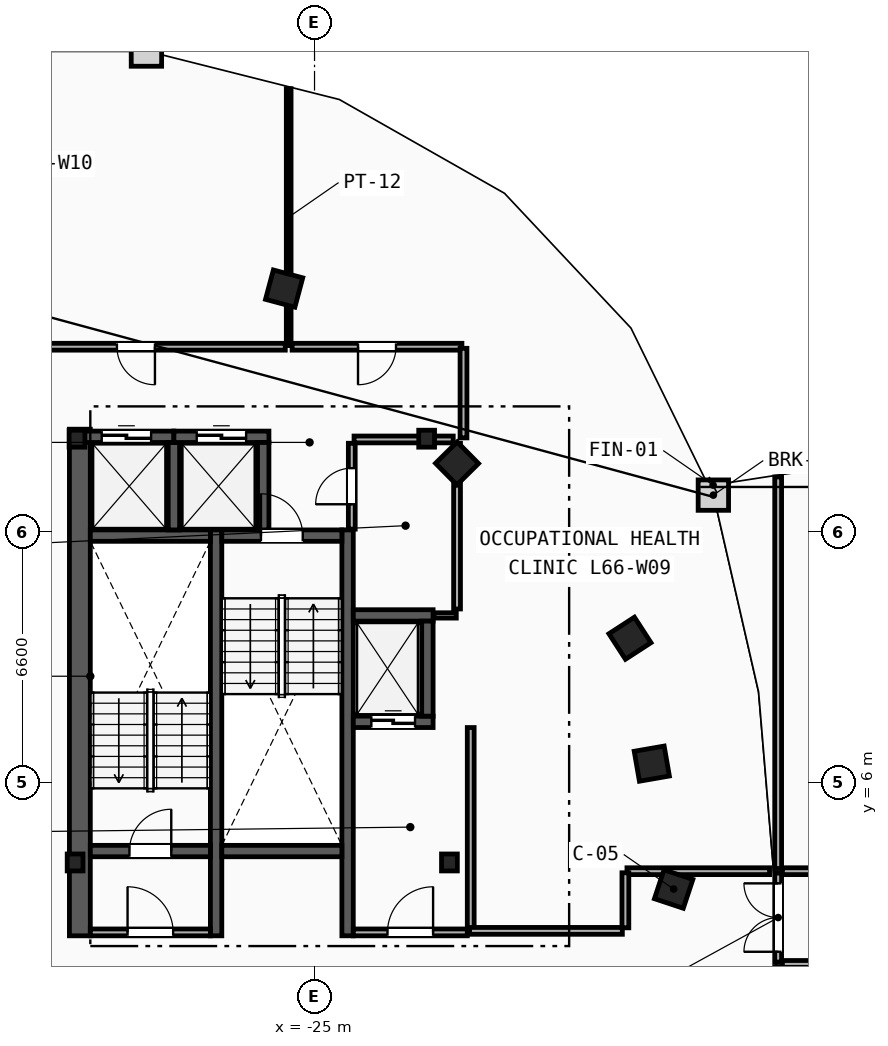
"""IFC4 building model, lengths in metres.
Left out: names, types, materials, properties, quantities, classifications, styles, units other than length and angle.
Written with IfcOpenShell. Run it as: python <this file> out.ifc"""

import sys

from ifc_helpers import new_model, si_unit, direction, frame, frame_2d, origin, origin_2d, place, context, subcontext, project, spatial, rectangle, i_section, extrude, element, fill, save


model = new_model("IFC4")
c1 = context("Model", 3, precision=1e-05, world=origin(), true_north=direction((0.0, 1.0)))
c2 = subcontext(c1, "Body", "Model", "MODEL_VIEW")
j1 = project(units=[si_unit("LENGTHUNIT", "METRE"), si_unit("PLANEANGLEUNIT", "RADIAN")], contexts=[c1])
p1 = place(None, origin())
s1 = spatial("IfcSite", under=j1, at=p1, CompositionType="ELEMENT")
p2 = place(p1, origin())
s2 = spatial("IfcBuilding", under=s1, at=p2, CompositionType="ELEMENT")
p3 = place(p2, frame((0.0, 0.0, 250.4)))
s3 = spatial("IfcBuildingStorey", under=s2, at=p3, CompositionType="ELEMENT", Elevation=250.4)
for number, where, z_axis, x_axis in (
    (1, (-31.3, 3.9, 0.0), (0.0, 0.0, 1.0), (1.0, 0.0, 0.0)),
    (2, (-21.45, 3.9, 0.0), (0.0, 0.0, 1.0), (1.0, 0.0, 0.0)),
    (3, (-22.05, 15.05, 0.0), (0.0, 0.0, 1.0), (1.0, 0.0, 0.0)),
    (4, (-31.25, 15.05, 0.0), (0.0, 0.0, 1.0), (1.0, 0.0, 0.0)),
):
    element("IfcColumn", number, at=place(p3, frame(where, z_axis=z_axis, x_axis=x_axis)), inside=s3, PredefinedType="COLUMN", context=c2, shape_type="SweptSolid", body=[
        extrude(i_section(OverallWidth=0.416, OverallDepth=0.446, WebThickness=0.039, FlangeThickness=0.063, FilletRadius=0.018, at=origin_2d()), origin(), (0.0, 0.0, 1.0), 3.6),
    ])
for number, where, z_axis, x_axis in (
    (5, (-15.55, 3.2, 0.0), (0.0, 0.0, 1.0), (0.315, 0.949, 0.0)),
    (6, (-16.125, 6.5, 0.0), (0.0, 0.0, 1.0), (-0.172, 0.985, 0.0)),
    (7, (-16.7, 9.8, 0.0), (0.0, 0.0, 1.0), (-0.544, 0.839, 0.0)),
    (8, (-21.25, 14.4, 0.0), (0.0, 0.0, 1.0), (-0.703, 0.711, 0.0)),
    (9, (-25.8, 19.0, 0.0), (0.0, 0.0, 1.0), (-0.966, 0.259, 0.0)),
):
    element("IfcColumn", number, at=place(p3, frame(where, z_axis=z_axis, x_axis=x_axis)), inside=s3, PredefinedType="COLUMN", context=c2, shape_type="SweptSolid", body=[
        extrude(rectangle(XDim=0.8, YDim=0.8, at=origin_2d()), origin(), (0.0, 0.0, 1.0), 3.6),
    ])
p4 = place(p3, frame((-31.175, 1.97, 0.0), z_axis=(0.0, 0.0, 1.0), x_axis=(0.0, 1.0, 0.0)))
e10 = element("IfcWall", 10, at=p4, inside=s3, PredefinedType="SHEAR", context=c2, shape_type="SweptSolid", body=[
    extrude(rectangle(XDim=13.33, YDim=0.55, at=frame_2d((6.665, 0.0))), origin(), (0.0, 0.0, 1.0), 3.34),
])
for number, where, z_axis, x_axis in (
    (11, (-27.59, 1.97, 0.0), (0.0, 0.0, 1.0), (0.0, 1.0, 0.0)),
    (12, (-24.13, 1.97, 0.0), (0.0, 0.0, 1.0), (0.0, 1.0, 0.0)),
):
    element("IfcWall", number, at=place(p3, frame(where, z_axis=z_axis, x_axis=x_axis)), inside=s3, PredefinedType="SHEAR", context=c2, shape_type="SweptSolid", body=[
        extrude(rectangle(XDim=10.68, YDim=0.3, at=frame_2d((5.34, 0.0))), origin(), (0.0, 0.0, 1.0), 3.34),
    ])
p5 = place(p3, frame((-30.9, 4.2, 0.0), z_axis=(0.0, 0.0, 1.0), x_axis=(1.0, 0.0, 0.0)))
e13 = element("IfcWall", 13, at=p5, inside=s3, PredefinedType="SHEAR", context=c2, shape_type="SweptSolid", body=[
    extrude(rectangle(XDim=3.16, YDim=0.3, at=frame_2d((1.58, 0.0))), origin(), (0.0, 0.0, 1.0), 3.34),
])
p6 = place(p5, frame((1.03, 0.0, 0.0)))
e14 = element("IfcOpeningElement", 14, at=p6, cuts=e13, PredefinedType="OPENING", context=c2, shape_type="SweptSolid", body=[
    extrude(rectangle(XDim=1.1, YDim=2.15, at=frame_2d((0.55, 1.075))), frame((0.0, 0.16, 0.0), z_axis=(0.0, -1.0, 0.0), x_axis=(1.0, 0.0, 0.0)), (0.0, 0.0, 1.0), 0.32),
])
p7 = place(p3, frame((-30.9, 12.5, 0.0), z_axis=(0.0, 0.0, 1.0), x_axis=(1.0, 0.0, 0.0)))
e15 = element("IfcWall", 15, at=p7, inside=s3, PredefinedType="SHEAR", context=c2, shape_type="SweptSolid", body=[
    extrude(rectangle(XDim=3.16, YDim=0.3, at=frame_2d((1.58, 0.0))), origin(), (0.0, 0.0, 1.0), 3.34),
])
p8 = place(p3, frame((-27.44, 12.5, 0.0), z_axis=(0.0, 0.0, 1.0), x_axis=(1.0, 0.0, 0.0)))
e16 = element("IfcWall", 16, at=p8, inside=s3, PredefinedType="SHEAR", context=c2, shape_type="SweptSolid", body=[
    extrude(rectangle(XDim=3.16, YDim=0.3, at=frame_2d((1.58, 0.0))), origin(), (0.0, 0.0, 1.0), 3.34),
])
p9 = place(p8, frame((1.03, 0.0, 0.0)))
e17 = element("IfcOpeningElement", 17, at=p9, cuts=e16, PredefinedType="OPENING", context=c2, shape_type="SweptSolid", body=[
    extrude(rectangle(XDim=1.1, YDim=2.15, at=frame_2d((0.55, 1.075))), frame((0.0, 0.16, 0.0), z_axis=(0.0, -1.0, 0.0), x_axis=(1.0, 0.0, 0.0)), (0.0, 0.0, 1.0), 0.32),
])
p10 = place(p3, frame((-27.44, 4.2, 0.0), z_axis=(0.0, 0.0, 1.0), x_axis=(1.0, 0.0, 0.0)))
e18 = element("IfcWall", 18, at=p10, inside=s3, PredefinedType="SHEAR", context=c2, shape_type="SweptSolid", body=[
    extrude(rectangle(XDim=3.16, YDim=0.3, at=frame_2d((1.58, 0.0))), origin(), (0.0, 0.0, 1.0), 3.34),
])
p11 = place(p3, frame((-20.89, 2.15, 0.0), z_axis=(0.0, 0.0, 1.0), x_axis=(0.0, 1.0, 0.0)))
e19 = element("IfcWall", 19, at=p11, inside=s3, PredefinedType="PARTITIONING", context=c2, shape_type="SweptSolid", body=[
    extrude(rectangle(XDim=5.3, YDim=0.18, at=frame_2d((2.65, 0.0))), origin(), (0.0, 0.0, 1.0), 3.34),
])
p12 = place(p3, frame((-23.98, 2.06, 0.0), z_axis=(0.0, 0.0, 1.0), x_axis=(1.0, 0.0, 0.0)))
e20 = element("IfcWall", 20, at=p12, inside=s3, PredefinedType="PARTITIONING", context=c2, shape_type="SweptSolid", body=[
    extrude(rectangle(XDim=3.0, YDim=0.18, at=frame_2d((1.5, 0.0))), origin(), (0.0, 0.0, 1.0), 3.34),
])
p13 = place(p12, frame((0.9, 0.0, 0.0)))
e21 = element("IfcOpeningElement", 21, at=p13, cuts=e20, PredefinedType="OPENING", context=c2, shape_type="SweptSolid", body=[
    extrude(rectangle(XDim=1.2, YDim=2.15, at=frame_2d((0.6, 1.075))), frame((0.0, 0.1, 0.0), z_axis=(0.0, -1.0, 0.0), x_axis=(1.0, 0.0, 0.0)), (0.0, 0.0, 1.0), 0.2),
])
p14 = place(p3, frame((-30.9, 2.06, 0.0), z_axis=(0.0, 0.0, 1.0), x_axis=(1.0, 0.0, 0.0)))
e22 = element("IfcWall", 22, at=p14, inside=s3, PredefinedType="PARTITIONING", context=c2, shape_type="SweptSolid", body=[
    extrude(rectangle(XDim=3.16, YDim=0.18, at=frame_2d((1.58, 0.0))), origin(), (0.0, 0.0, 1.0), 3.34),
])
p15 = place(p14, frame((0.98, 0.0, 0.0)))
e23 = element("IfcOpeningElement", 23, at=p15, cuts=e22, PredefinedType="OPENING", context=c2, shape_type="SweptSolid", body=[
    extrude(rectangle(XDim=1.2, YDim=2.15, at=frame_2d((0.6, 1.075))), frame((0.0, 0.1, 0.0), z_axis=(0.0, -1.0, 0.0), x_axis=(1.0, 0.0, 0.0)), (0.0, 0.0, 1.0), 0.2),
])
p16 = place(p3, frame((-23.98, 7.6, 0.0), z_axis=(0.0, 0.0, 1.0), x_axis=(1.0, 0.0, 0.0)))
e24 = element("IfcWall", 24, at=p16, inside=s3, PredefinedType="SHEAR", context=c2, shape_type="SweptSolid", body=[
    extrude(rectangle(XDim=2.1, YDim=0.3, at=frame_2d((1.05, 0.0))), origin(), (0.0, 0.0, 1.0), 3.34),
])
p17 = place(p16, frame((0.475, 0.0, 0.0)))
e25 = element("IfcOpeningElement", 25, at=p17, cuts=e24, PredefinedType="OPENING", context=c2, shape_type="SweptSolid", body=[
    extrude(rectangle(XDim=1.15, YDim=2.2, at=frame_2d((0.575, 1.1))), frame((0.0, 0.16, 0.0), z_axis=(0.0, -1.0, 0.0), x_axis=(1.0, 0.0, 0.0)), (0.0, 0.0, 1.0), 0.32),
])
p18 = place(p3, frame((-23.98, 10.4, 0.0), z_axis=(0.0, 0.0, 1.0), x_axis=(1.0, 0.0, 0.0)))
e26 = element("IfcWall", 26, at=p18, inside=s3, PredefinedType="SHEAR", context=c2, shape_type="SweptSolid", body=[
    extrude(rectangle(XDim=2.1, YDim=0.3, at=frame_2d((1.05, 0.0))), origin(), (0.0, 0.0, 1.0), 3.34),
])
p19 = place(p3, frame((-22.03, 7.75, 0.0), z_axis=(0.0, 0.0, 1.0), x_axis=(0.0, 1.0, 0.0)))
e27 = element("IfcWall", 27, at=p19, inside=s3, PredefinedType="SHEAR", context=c2, shape_type="SweptSolid", body=[
    extrude(rectangle(XDim=2.5, YDim=0.3, at=frame_2d((1.25, 0.0))), origin(), (0.0, 0.0, 1.0), 3.34),
])
p20 = place(p3, frame((-31.2, 15.1, 0.0), z_axis=(0.0, 0.0, 1.0), x_axis=(1.0, 0.0, 0.0)))
e28 = element("IfcWall", 28, at=p20, inside=s3, PredefinedType="SHEAR", context=c2, shape_type="SweptSolid", body=[
    extrude(rectangle(XDim=2.5, YDim=0.3, at=frame_2d((1.25, 0.0))), origin(), (0.0, 0.0, 1.0), 3.34),
])
p21 = place(p20, frame((0.6, 0.0, 0.0)))
e29 = element("IfcOpeningElement", 29, at=p21, cuts=e28, PredefinedType="OPENING", context=c2, shape_type="SweptSolid", body=[
    extrude(rectangle(XDim=1.3, YDim=2.2, at=frame_2d((0.65, 1.1))), frame((0.0, 0.16, 0.0), z_axis=(0.0, -1.0, 0.0), x_axis=(1.0, 0.0, 0.0)), (0.0, 0.0, 1.0), 0.32),
])
p22 = place(p3, frame((-28.7, 12.65, 0.0), z_axis=(0.0, 0.0, 1.0), x_axis=(0.0, 1.0, 0.0)))
e30 = element("IfcWall", 30, at=p22, inside=s3, PredefinedType="SHEAR", context=c2, shape_type="SweptSolid", body=[
    extrude(rectangle(XDim=2.3, YDim=0.3, at=frame_2d((1.15, 0.0))), origin(), (0.0, 0.0, 1.0), 3.34),
])
p23 = place(p3, frame((-28.7, 15.1, 0.0), z_axis=(0.0, 0.0, 1.0), x_axis=(1.0, 0.0, 0.0)))
e31 = element("IfcWall", 31, at=p23, inside=s3, PredefinedType="SHEAR", context=c2, shape_type="SweptSolid", body=[
    extrude(rectangle(XDim=2.5, YDim=0.3, at=frame_2d((1.25, 0.0))), origin(), (0.0, 0.0, 1.0), 3.34),
])
p24 = place(p23, frame((0.6, 0.0, 0.0)))
e32 = element("IfcOpeningElement", 32, at=p24, cuts=e31, PredefinedType="OPENING", context=c2, shape_type="SweptSolid", body=[
    extrude(rectangle(XDim=1.3, YDim=2.2, at=frame_2d((0.65, 1.1))), frame((0.0, 0.16, 0.0), z_axis=(0.0, -1.0, 0.0), x_axis=(1.0, 0.0, 0.0)), (0.0, 0.0, 1.0), 0.32),
])
p25 = place(p3, frame((-26.35, 12.65, 0.0), z_axis=(0.0, 0.0, 1.0), x_axis=(0.0, 1.0, 0.0)))
e33 = element("IfcWall", 33, at=p25, inside=s3, PredefinedType="SHEAR", context=c2, shape_type="SweptSolid", body=[
    extrude(rectangle(XDim=2.3, YDim=0.3, at=frame_2d((1.15, 0.0))), origin(), (0.0, 0.0, 1.0), 3.34),
])
p26 = place(p3, frame((-21.86, 10.4, 0.0), z_axis=(0.0, 0.0, 1.0), x_axis=(1.0, 0.0, 0.0)))
e34 = element("IfcWall", 34, at=p26, inside=s3, PredefinedType="PARTITIONING", context=c2, shape_type="SweptSolid", body=[
    extrude(rectangle(XDim=0.59, YDim=0.14, at=frame_2d((0.295, 0.0))), origin(), (0.0, 0.0, 1.0), 3.34),
])
p27 = place(p3, frame((-21.25, 10.57, 0.0), z_axis=(0.0, 0.0, 1.0), x_axis=(0.0, 1.0, 0.0)))
e35 = element("IfcWall", 35, at=p27, inside=s3, PredefinedType="PARTITIONING", context=c2, shape_type="SweptSolid", body=[
    extrude(rectangle(XDim=4.36, YDim=0.18, at=frame_2d((2.18, 0.0))), origin(), (0.0, 0.0, 1.0), 3.34),
])
p28 = place(p3, frame((-23.96, 15.03, 0.0), z_axis=(0.0, 0.0, 1.0), x_axis=(1.0, 0.0, 0.0)))
e36 = element("IfcWall", 36, at=p28, inside=s3, PredefinedType="PARTITIONING", context=c2, shape_type="SweptSolid", body=[
    extrude(rectangle(XDim=2.61, YDim=0.18, at=frame_2d((1.305, 0.0))), origin(), (0.0, 0.0, 1.0), 2.413),
])
p29 = place(p3, frame((-24.02, 12.67, 0.0), z_axis=(0.0, 0.0, 1.0), x_axis=(0.0, 1.0, 0.0)))
e37 = element("IfcWall", 37, at=p29, inside=s3, PredefinedType="PARTITIONING", context=c2, shape_type="SweptSolid", body=[
    extrude(rectangle(XDim=2.26, YDim=0.18, at=frame_2d((1.13, 0.0))), origin(), (0.0, 0.0, 1.0), 3.34),
])
p30 = place(p29, frame((0.655, 0.0, 0.0)))
e38 = element("IfcOpeningElement", 38, at=p30, cuts=e37, PredefinedType="OPENING", context=c2, shape_type="SweptSolid", body=[
    extrude(rectangle(XDim=0.95, YDim=2.1, at=frame_2d((0.475, 1.05))), frame((0.0, 0.1, 0.0), z_axis=(0.0, -1.0, 0.0), x_axis=(1.0, 0.0, 0.0)), (0.0, 0.0, 1.0), 0.2),
])
p31 = place(p3, frame((-25.68, 17.5, 0.0), z_axis=(0.0, 0.0, 1.0), x_axis=(0.0, 1.0, 0.0)))
e39 = element("IfcWall", 39, at=p31, inside=s3, PredefinedType="PARTITIONING", context=c2, shape_type="SweptSolid", body=[
    extrude(rectangle(XDim=6.76, YDim=0.125, at=frame_2d((3.38, 0.0))), origin(), (0.0, 0.0, 1.0), 3.34),
])
p32 = place(p3, frame((-21.122, 17.47, 0.0), z_axis=(0.0, 0.0, 1.0), x_axis=(-1.0, 0.0, 0.0)))
e40 = element("IfcWall", 40, at=p32, inside=s3, PredefinedType="PARTITIONING", context=c2, shape_type="SweptSolid", body=[
    extrude(rectangle(XDim=4.469, YDim=0.18, at=frame_2d((2.234, 0.0))), origin(), (0.0, 0.0, 1.0), 3.34),
])
p33 = place(p32, frame((1.734, 0.0, 0.0)))
e41 = element("IfcOpeningElement", 41, at=p33, cuts=e40, PredefinedType="OPENING", context=c2, shape_type="SweptSolid", body=[
    extrude(rectangle(XDim=1.0, YDim=2.15, at=frame_2d((0.5, 1.075))), frame((0.0, 0.1, 0.0), z_axis=(0.0, -1.0, 0.0), x_axis=(1.0, 0.0, 0.0)), (0.0, 0.0, 1.0), 0.2),
])
p34 = place(p3, frame((-16.9, 2.1, 0.0), z_axis=(0.0, 0.0, 1.0), x_axis=(-1.0, 0.0, 0.0)))
e42 = element("IfcWall", 42, at=p34, inside=s3, PredefinedType="PARTITIONING", context=c2, shape_type="SweptSolid", body=[
    extrude(rectangle(XDim=4.02, YDim=0.18, at=frame_2d((2.01, 0.0))), origin(), (0.0, 0.0, 1.0), 3.34),
])
p35 = place(p3, frame((-13.026, 3.67, 0.0), z_axis=(0.0, 0.0, 1.0), x_axis=(-1.0, 0.0, 0.0)))
e43 = element("IfcWall", 43, at=p35, inside=s3, PredefinedType="PARTITIONING", context=c2, shape_type="SweptSolid", body=[
    extrude(rectangle(XDim=3.753, YDim=0.18, at=frame_2d((1.876, 0.0))), origin(), (0.0, 0.0, 1.0), 3.34),
])
p36 = place(p3, frame((-21.08, 15.072, 0.0), z_axis=(0.0, 0.0, 1.0), x_axis=(0.0, 1.0, 0.0)))
e44 = element("IfcWall", 44, at=p36, inside=s3, PredefinedType="PARTITIONING", context=c2, shape_type="SweptSolid", body=[
    extrude(rectangle(XDim=2.357, YDim=0.18, at=frame_2d((1.178, 0.0))), origin(), (0.0, 0.0, 1.0), 3.34),
])
p37 = place(p3, frame((-16.82, 3.628, 0.0), z_axis=(0.0, 0.0, 1.0), x_axis=(0.0, -1.0, 0.0)))
e45 = element("IfcWall", 45, at=p37, inside=s3, PredefinedType="PARTITIONING", context=c2, shape_type="SweptSolid", body=[
    extrude(rectangle(XDim=1.448, YDim=0.18, at=frame_2d((0.724, 0.0))), origin(), (0.0, 0.0, 1.0), 3.34),
])
p38 = place(p3, frame((-25.77, 17.47, 0.0), z_axis=(0.0, 0.0, 1.0), x_axis=(-1.0, 0.0, 0.0)))
e46 = element("IfcWall", 46, at=p38, inside=s3, PredefinedType="PARTITIONING", context=c2, shape_type="SweptSolid", body=[
    extrude(rectangle(XDim=7.858, YDim=0.18, at=frame_2d((3.929, 0.0))), origin(), (0.0, 0.0, 1.0), 3.34),
])
p39 = place(p38, frame((3.429, 0.0, 0.0)))
e47 = element("IfcOpeningElement", 47, at=p39, cuts=e46, PredefinedType="OPENING", context=c2, shape_type="SweptSolid", body=[
    extrude(rectangle(XDim=1.0, YDim=2.15, at=frame_2d((0.5, 1.075))), frame((0.0, 0.1, 0.0), z_axis=(0.0, -1.0, 0.0), x_axis=(1.0, 0.0, 0.0)), (0.0, 0.0, 1.0), 0.2),
])
p40 = place(p3, frame((-12.688, 1.23, 0.0), z_axis=(0.0, 0.0, 1.0), x_axis=(1.0, 0.0, 0.0)))
e48 = element("IfcWall", 48, at=p40, inside=s3, PredefinedType="PARTITIONING", context=c2, shape_type="SweptSolid", body=[
    extrude(rectangle(XDim=12.594, YDim=0.18, at=frame_2d((6.297, 0.0))), origin(), (0.0, 0.0, 1.0), 2.663),
])
p41 = place(p40, frame((5.497, 0.0, 0.0)))
e49 = element("IfcOpeningElement", 49, at=p41, cuts=e48, PredefinedType="OPENING", context=c2, shape_type="SweptSolid", body=[
    extrude(rectangle(XDim=1.6, YDim=2.2, at=frame_2d((0.8, 1.1))), frame((0.0, 0.1, 0.0), z_axis=(0.0, -1.0, 0.0), x_axis=(1.0, 0.0, 0.0)), (0.0, 0.0, 1.0), 0.2),
])
p42 = place(p3, frame((-0.095, 3.67, 0.0), z_axis=(0.0, 0.0, 1.0), x_axis=(-1.0, 0.0, 0.0)))
e50 = element("IfcWall", 50, at=p42, inside=s3, PredefinedType="PARTITIONING", context=c2, shape_type="SweptSolid", body=[
    extrude(rectangle(XDim=12.594, YDim=0.18, at=frame_2d((6.297, 0.0))), origin(), (0.0, 0.0, 1.0), 3.34),
])
p43 = place(p42, frame((5.497, 0.0, 0.0)))
e51 = element("IfcOpeningElement", 51, at=p43, cuts=e50, PredefinedType="OPENING", context=c2, shape_type="SweptSolid", body=[
    extrude(rectangle(XDim=1.6, YDim=2.2, at=frame_2d((0.8, 1.1))), frame((0.0, 0.1, 0.0), z_axis=(0.0, -1.0, 0.0), x_axis=(1.0, 0.0, 0.0)), (0.0, 0.0, 1.0), 0.2),
])
p44 = place(p3, frame((-12.8, -0.285, 0.0), z_axis=(0.0, 0.0, 1.0), x_axis=(0.0, 1.0, 0.0)))
e52 = element("IfcWall", 52, at=p44, inside=s3, PredefinedType="PARTITIONING", context=c2, shape_type="SweptSolid", body=[
    extrude(rectangle(XDim=1.445, YDim=0.18, at=frame_2d((0.722, 0.0))), origin(), (0.0, 0.0, 1.0), 3.34),
])
p45 = place(p3, frame((-12.8, 3.74, 0.0), z_axis=(0.0, 0.0, 1.0), x_axis=(0.0, 1.0, 0.0)))
e53 = element("IfcWall", 53, at=p45, inside=s3, PredefinedType="PARTITIONING", context=c2, shape_type="SweptSolid", body=[
    extrude(rectangle(XDim=10.304, YDim=0.18, at=frame_2d((5.152, 0.0))), origin(), (0.0, 0.0, 1.0), 3.34),
])
p46 = place(p3, frame((-12.8, 1.28, 0.0), z_axis=(0.0, 0.0, 1.0), x_axis=(0.0, 1.0, 0.0)))
e54 = element("IfcWall", 54, at=p46, inside=s3, PredefinedType="PARTITIONING", context=c2, shape_type="SweptSolid", body=[
    extrude(rectangle(XDim=2.34, YDim=0.18, at=frame_2d((1.17, 0.0))), origin(), (0.0, 0.0, 1.0), 3.34),
])
p47 = place(p46, frame((0.27, 0.0, 0.0)))
e55 = element("IfcOpeningElement", 55, at=p47, cuts=e54, PredefinedType="OPENING", context=c2, shape_type="SweptSolid", body=[
    extrude(rectangle(XDim=1.8, YDim=2.25, at=frame_2d((0.9, 1.125))), frame((0.0, 0.1, 0.0), z_axis=(0.0, -1.0, 0.0), x_axis=(1.0, 0.0, 0.0)), (0.0, 0.0, 1.0), 0.2),
])
p48 = place(p6, origin())
e56 = element("IfcDoor", 56, at=p48, inside=s3, OperationType="SINGLE_SWING_RIGHT", PredefinedType="DOOR", context=c2, shape_type="SweptSolid", body=[
    extrude(rectangle(XDim=1.1, YDim=2.15, at=frame_2d((0.55, 1.075))), frame((0.0, 0.025, 0.0), z_axis=(0.0, -1.0, 0.0), x_axis=(1.0, 0.0, 0.0)), (0.0, 0.0, 1.0), 0.05),
])
fill(e14, e56)
p49 = place(p9, origin())
e57 = element("IfcDoor", 57, at=p49, inside=s3, OperationType="SINGLE_SWING_LEFT", PredefinedType="DOOR", context=c2, shape_type="SweptSolid", body=[
    extrude(rectangle(XDim=1.1, YDim=2.15, at=frame_2d((0.55, 1.075))), frame((0.0, 0.025, 0.0), z_axis=(0.0, -1.0, 0.0), x_axis=(1.0, 0.0, 0.0)), (0.0, 0.0, 1.0), 0.05),
])
fill(e17, e57)
p50 = place(p13, origin())
e58 = element("IfcDoor", 58, at=p50, inside=s3, OperationType="SINGLE_SWING_RIGHT", PredefinedType="DOOR", context=c2, shape_type="SweptSolid", body=[
    extrude(rectangle(XDim=1.2, YDim=2.15, at=frame_2d((0.6, 1.075))), frame((0.0, 0.025, 0.0), z_axis=(0.0, -1.0, 0.0), x_axis=(1.0, 0.0, 0.0)), (0.0, 0.0, 1.0), 0.05),
])
fill(e21, e58)
p51 = place(p15, origin())
e59 = element("IfcDoor", 59, at=p51, inside=s3, OperationType="SINGLE_SWING_LEFT", PredefinedType="DOOR", context=c2, shape_type="SweptSolid", body=[
    extrude(rectangle(XDim=1.2, YDim=2.15, at=frame_2d((0.6, 1.075))), frame((0.0, 0.025, 0.0), z_axis=(0.0, -1.0, 0.0), x_axis=(1.0, 0.0, 0.0)), (0.0, 0.0, 1.0), 0.05),
])
fill(e23, e59)
p52 = place(p17, origin())
e60 = element("IfcDoor", 60, at=p52, inside=s3, OperationType="SLIDING_TO_LEFT", PredefinedType="TRAPDOOR", context=c2, shape_type="SweptSolid", body=[
    extrude(rectangle(XDim=1.15, YDim=2.2, at=frame_2d((0.575, 1.1))), frame((0.0, 0.025, 0.0), z_axis=(0.0, -1.0, 0.0), x_axis=(1.0, 0.0, 0.0)), (0.0, 0.0, 1.0), 0.05),
])
fill(e25, e60)
p53 = place(p21, origin())
e61 = element("IfcDoor", 61, at=p53, inside=s3, OperationType="SLIDING_TO_LEFT", PredefinedType="TRAPDOOR", context=c2, shape_type="SweptSolid", body=[
    extrude(rectangle(XDim=1.3, YDim=2.2, at=frame_2d((0.65, 1.1))), frame((0.0, 0.025, 0.0), z_axis=(0.0, -1.0, 0.0), x_axis=(1.0, 0.0, 0.0)), (0.0, 0.0, 1.0), 0.05),
])
fill(e29, e61)
p54 = place(p24, origin())
e62 = element("IfcDoor", 62, at=p54, inside=s3, OperationType="SLIDING_TO_LEFT", PredefinedType="TRAPDOOR", context=c2, shape_type="SweptSolid", body=[
    extrude(rectangle(XDim=1.3, YDim=2.2, at=frame_2d((0.65, 1.1))), frame((0.0, 0.025, 0.0), z_axis=(0.0, -1.0, 0.0), x_axis=(1.0, 0.0, 0.0)), (0.0, 0.0, 1.0), 0.05),
])
fill(e32, e62)
p55 = place(p39, origin())
e63 = element("IfcDoor", 63, at=p55, inside=s3, OperationType="SINGLE_SWING_LEFT", PredefinedType="DOOR", context=c2, shape_type="SweptSolid", body=[
    extrude(rectangle(XDim=1.0, YDim=2.15, at=frame_2d((0.5, 1.075))), frame((0.0, 0.025, 0.0), z_axis=(0.0, -1.0, 0.0), x_axis=(1.0, 0.0, 0.0)), (0.0, 0.0, 1.0), 0.05),
])
fill(e47, e63)
p56 = place(p33, origin())
e64 = element("IfcDoor", 64, at=p56, inside=s3, OperationType="SINGLE_SWING_RIGHT", PredefinedType="DOOR", context=c2, shape_type="SweptSolid", body=[
    extrude(rectangle(XDim=1.0, YDim=2.15, at=frame_2d((0.5, 1.075))), frame((0.0, 0.025, 0.0), z_axis=(0.0, -1.0, 0.0), x_axis=(1.0, 0.0, 0.0)), (0.0, 0.0, 1.0), 0.05),
])
fill(e41, e64)
p57 = place(p47, origin())
e65 = element("IfcDoor", 65, at=p57, inside=s3, OperationType="DOUBLE_DOOR_SINGLE_SWING", PredefinedType="DOOR", context=c2, shape_type="SweptSolid", body=[
    extrude(rectangle(XDim=1.8, YDim=2.25, at=frame_2d((0.9, 1.125))), frame((0.0, 0.025, 0.0), z_axis=(0.0, -1.0, 0.0), x_axis=(1.0, 0.0, 0.0)), (0.0, 0.0, 1.0), 0.05),
])
fill(e55, e65)
p58 = place(p30, origin())
e66 = element("IfcDoor", 66, at=p58, inside=s3, OperationType="SINGLE_SWING_LEFT", PredefinedType="DOOR", context=c2, shape_type="SweptSolid", body=[
    extrude(rectangle(XDim=0.95, YDim=2.1, at=frame_2d((0.475, 1.05))), frame((0.0, 0.025, 0.0), z_axis=(0.0, -1.0, 0.0), x_axis=(1.0, 0.0, 0.0)), (0.0, 0.0, 1.0), 0.05),
])
fill(e38, e66)
save(model, sys.argv[1])
